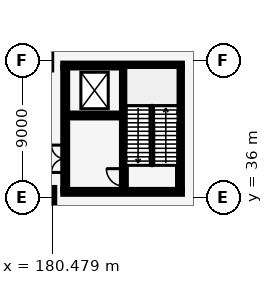
"""IFC4 building model, lengths in metres.
Left out: names, types, materials, properties, quantities, classifications, styles, units other than length and angle.
Written with IfcOpenShell. Run it as: python <this file> out.ifc"""

import sys

from ifc_helpers import new_model, si_unit, direction, frame, frame_2d, origin, origin_2d, place, context, subcontext, project, spatial, rectangle, extrude, element, fill, save


model = new_model("IFC4")
c1 = context("Model", 3, precision=1e-05, world=origin(), true_north=direction((0.0, 1.0)))
c2 = subcontext(c1, "Body", "Model", "MODEL_VIEW")
j1 = project(units=[si_unit("LENGTHUNIT", "METRE"), si_unit("PLANEANGLEUNIT", "RADIAN")], contexts=[c1])
p1 = place(None, origin())
s1 = spatial("IfcSite", under=j1, at=p1, CompositionType="ELEMENT")
p2 = place(p1, origin())
s2 = spatial("IfcBuilding", under=s1, at=p2, CompositionType="ELEMENT")
p3 = place(p2, frame((0.0, 0.0, -5.0)))
s3 = spatial("IfcBuildingStorey", under=s2, at=p3, CompositionType="ELEMENT", Elevation=-5.0)
p4 = place(p3, frame((180.0, 36.0, 0.0), z_axis=(0.0, 0.0, 1.0), x_axis=(1.0, 0.0, 0.0)))
e1 = element("IfcColumn", 1, at=p4, inside=s3, PredefinedType="COLUMN", context=c2, shape_type="SweptSolid", body=[
    extrude(rectangle(XDim=1.2, YDim=1.2, at=origin_2d()), origin(), (0.0, 0.0, 1.0), 5.0),
])
p5 = place(p3, frame((181.325, 36.47, 0.0), z_axis=(0.0, 0.0, 1.0), x_axis=(0.0, 1.0, 0.0)))
e2 = element("IfcWall", 2, at=p5, inside=s3, PredefinedType="SHEAR", context=c2, shape_type="SweptSolid", body=[
    extrude(rectangle(XDim=8.06, YDim=0.25, at=frame_2d((4.03, 0.0))), origin(), (0.0, 0.0, 1.0), 4.64),
])
p6 = place(p5, frame((1.15, 0.0, 0.0)))
e3 = element("IfcOpeningElement", 3, at=p6, cuts=e2, PredefinedType="OPENING", context=c2, shape_type="SweptSolid", body=[
    extrude(rectangle(XDim=1.8, YDim=2.2, at=frame_2d((0.9, 1.1))), frame((0.0, 0.135, 0.0), z_axis=(0.0, -1.0, 0.0), x_axis=(1.0, 0.0, 0.0)), (0.0, 0.0, 1.0), 0.27),
])
p7 = place(p3, frame((188.875, 36.47, 0.0), z_axis=(0.0, 0.0, 1.0), x_axis=(0.0, 1.0, 0.0)))
e4 = element("IfcWall", 4, at=p7, inside=s3, PredefinedType="SHEAR", context=c2, shape_type="SweptSolid", body=[
    extrude(rectangle(XDim=8.06, YDim=0.25, at=frame_2d((4.03, 0.0))), origin(), (0.0, 0.0, 1.0), 4.64),
])
for number, where, z_axis, x_axis in (
    (5, (181.2, 36.345, 0.0), (0.0, 0.0, 1.0), (1.0, 0.0, 0.0)),
    (6, (181.2, 44.655, 0.0), (0.0, 0.0, 1.0), (1.0, 0.0, 0.0)),
):
    element("IfcWall", number, at=place(p3, frame(where, z_axis=z_axis, x_axis=x_axis)), inside=s3, PredefinedType="SHEAR", context=c2, shape_type="SweptSolid", body=[
        extrude(rectangle(XDim=7.8, YDim=0.25, at=frame_2d((3.9, 0.0))), origin(), (0.0, 0.0, 1.0), 4.64),
    ])
p8 = place(p3, frame((185.185, 36.47, 0.0), z_axis=(0.0, 0.0, 1.0), x_axis=(0.0, 1.0, 0.0)))
e7 = element("IfcWall", 7, at=p8, inside=s3, PredefinedType="SHEAR", context=c2, shape_type="SweptSolid", body=[
    extrude(rectangle(XDim=8.06, YDim=0.25, at=frame_2d((4.03, 0.0))), origin(), (0.0, 0.0, 1.0), 4.64),
])
p9 = place(p8, frame((0.25, 0.0, 0.0)))
e8 = element("IfcOpeningElement", 8, at=p9, cuts=e7, PredefinedType="OPENING", context=c2, shape_type="SweptSolid", body=[
    extrude(rectangle(XDim=1.15, YDim=2.15, at=frame_2d((0.575, 1.075))), frame((0.0, 0.135, 0.0), z_axis=(0.0, -1.0, 0.0), x_axis=(1.0, 0.0, 0.0)), (0.0, 0.0, 1.0), 0.27),
])
p10 = place(p3, frame((181.45, 41.37, 0.0), z_axis=(0.0, 0.0, 1.0), x_axis=(1.0, 0.0, 0.0)))
e9 = element("IfcWall", 9, at=p10, inside=s3, PredefinedType="SHEAR", context=c2, shape_type="SweptSolid", body=[
    extrude(rectangle(XDim=3.61, YDim=0.25, at=frame_2d((1.805, 0.0))), origin(), (0.0, 0.0, 1.0), 4.64),
])
p11 = place(p10, frame((0.95, 0.0, 0.0)))
e10 = element("IfcOpeningElement", 10, at=p11, cuts=e9, PredefinedType="OPENING", context=c2, shape_type="SweptSolid", body=[
    extrude(rectangle(XDim=1.2, YDim=2.2, at=frame_2d((0.6, 1.1))), frame((0.0, 0.135, 0.0), z_axis=(0.0, -1.0, 0.0), x_axis=(1.0, 0.0, 0.0)), (0.0, 0.0, 1.0), 0.27),
])
p12 = place(p9, origin())
e11 = element("IfcDoor", 11, at=p12, inside=s3, OperationType="SINGLE_SWING_RIGHT", PredefinedType="DOOR", context=c2, shape_type="SweptSolid", body=[
    extrude(rectangle(XDim=1.15, YDim=2.15, at=frame_2d((0.575, 1.075))), frame((0.0, 0.025, 0.0), z_axis=(0.0, -1.0, 0.0), x_axis=(1.0, 0.0, 0.0)), (0.0, 0.0, 1.0), 0.05),
])
fill(e8, e11)
p13 = place(p11, origin())
e12 = element("IfcDoor", 12, at=p13, inside=s3, OperationType="DOUBLE_DOOR_SLIDING", PredefinedType="DOOR", context=c2, shape_type="SweptSolid", body=[
    extrude(rectangle(XDim=1.2, YDim=2.2, at=frame_2d((0.6, 1.1))), frame((0.0, 0.025, 0.0), z_axis=(0.0, -1.0, 0.0), x_axis=(1.0, 0.0, 0.0)), (0.0, 0.0, 1.0), 0.05),
])
fill(e10, e12)
p14 = place(p6, origin())
e13 = element("IfcDoor", 13, at=p14, inside=s3, OperationType="DOUBLE_DOOR_SINGLE_SWING", PredefinedType="DOOR", context=c2, shape_type="SweptSolid", body=[
    extrude(rectangle(XDim=1.8, YDim=2.2, at=frame_2d((0.9, 1.1))), frame((0.0, 0.025, 0.0), z_axis=(0.0, -1.0, 0.0), x_axis=(1.0, 0.0, 0.0)), (0.0, 0.0, 1.0), 0.05),
])
fill(e3, e13)
save(model, sys.argv[1])
